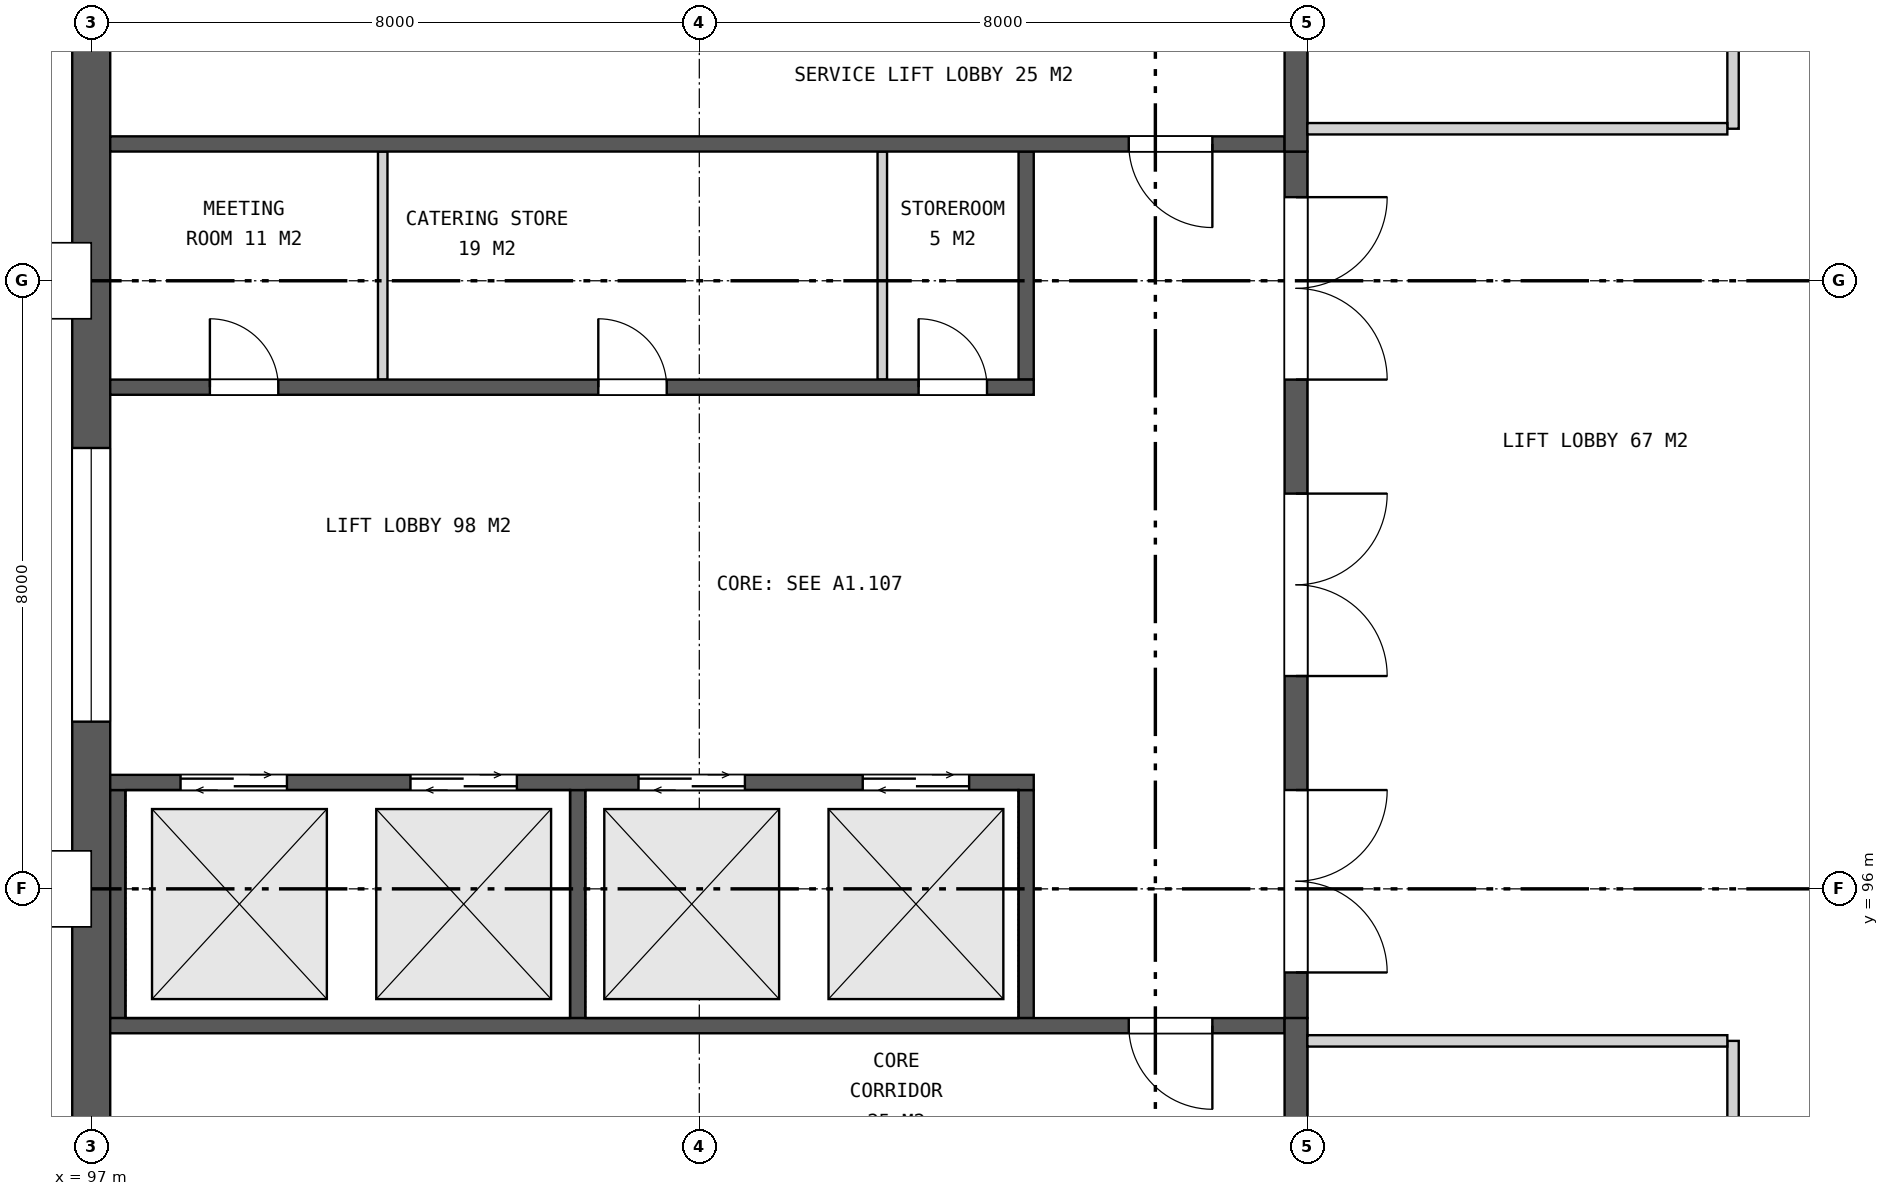
"""IFC4 building model, lengths in metres.
Left out: names, types, materials, properties, quantities, classifications, styles, units other than length and angle.
Written with IfcOpenShell. Run it as: python <this file> out.ifc"""

import sys

from ifc_helpers import new_model, si_unit, direction, frame, frame_2d, origin, place, context, subcontext, project, spatial, rectangle, extrude, element, fill, save


model = new_model("IFC4")
c1 = context("Model", 3, precision=1e-05, world=origin(), true_north=direction((0.0, 1.0)))
c2 = subcontext(c1, "Body", "Model", "MODEL_VIEW")
j1 = project(units=[si_unit("LENGTHUNIT", "METRE"), si_unit("PLANEANGLEUNIT", "RADIAN")], contexts=[c1])
p1 = place(None, origin())
s1 = spatial("IfcSite", under=j1, at=p1, CompositionType="ELEMENT")
p2 = place(p1, origin())
s2 = spatial("IfcBuilding", under=s1, at=p2, CompositionType="ELEMENT")
p3 = place(p2, frame((0.0, 0.0, 344.9)))
s3 = spatial("IfcBuildingStorey", under=s2, at=p3, CompositionType="ELEMENT", Elevation=344.9)
p4 = place(p3, frame((97.0, 111.75, 0.0), z_axis=(0.0, 0.0, 1.0), x_axis=(0.0, -1.0, 0.0)))
e1 = element("IfcWall", 1, at=p4, inside=s3, PredefinedType="SHEAR", context=c2, shape_type="SweptSolid", body=[
    extrude(rectangle(XDim=23.5, YDim=0.5, at=frame_2d((11.75, 0.0))), origin(), (0.0, 0.0, 1.0), 4.2),
])
p5 = place(p4, frame((9.95, 0.0, 0.15)))
e2 = element("IfcOpeningElement", 2, at=p5, cuts=e1, PredefinedType="OPENING", context=c2, shape_type="SweptSolid", body=[
    extrude(rectangle(XDim=3.6, YDim=3.0, at=frame_2d((1.8, 1.5))), frame((0.0, 0.26, 0.0), z_axis=(0.0, -1.0, 0.0), x_axis=(1.0, 0.0, 0.0)), (0.0, 0.0, 1.0), 0.52),
])
p6 = place(p3, frame((112.85, 105.7, 0.0), z_axis=(0.0, 0.0, 1.0), x_axis=(0.0, -1.0, 0.0)))
e3 = element("IfcWall", 3, at=p6, inside=s3, PredefinedType="SHEAR", context=c2, shape_type="SweptSolid", body=[
    extrude(rectangle(XDim=11.4, YDim=0.3, at=frame_2d((5.7, 0.0))), origin(), (0.0, 0.0, 1.0), 4.2),
])
p7 = place(p6, frame((0.6, 0.0, 0.0)))
e4 = element("IfcOpeningElement", 4, at=p7, cuts=e3, PredefinedType="OPENING", context=c2, shape_type="SweptSolid", body=[
    extrude(rectangle(XDim=2.4, YDim=2.4, at=frame_2d((1.2, 1.2))), frame((0.0, 0.16, 0.0), z_axis=(0.0, -1.0, 0.0), x_axis=(1.0, 0.0, 0.0)), (0.0, 0.0, 1.0), 0.32),
])
p8 = place(p6, frame((4.5, 0.0, 0.0)))
e5 = element("IfcOpeningElement", 5, at=p8, cuts=e3, PredefinedType="OPENING", context=c2, shape_type="SweptSolid", body=[
    extrude(rectangle(XDim=2.4, YDim=2.4, at=frame_2d((1.2, 1.2))), frame((0.0, 0.16, 0.0), z_axis=(0.0, -1.0, 0.0), x_axis=(1.0, 0.0, 0.0)), (0.0, 0.0, 1.0), 0.32),
])
p9 = place(p6, frame((8.4, 0.0, 0.0)))
e6 = element("IfcOpeningElement", 6, at=p9, cuts=e3, PredefinedType="OPENING", context=c2, shape_type="SweptSolid", body=[
    extrude(rectangle(XDim=2.4, YDim=2.4, at=frame_2d((1.2, 1.2))), frame((0.0, 0.16, 0.0), z_axis=(0.0, -1.0, 0.0), x_axis=(1.0, 0.0, 0.0)), (0.0, 0.0, 1.0), 0.32),
])
for number, where, z_axis, x_axis in (
    (7, (109.3, 97.3, 0.0), (0.0, 0.0, 1.0), (0.0, -1.0, 0.0)),
    (8, (103.4, 97.3, 0.0), (0.0, 0.0, 1.0), (0.0, -1.0, 0.0)),
    (9, (97.35, 97.3, 0.0), (0.0, 0.0, 1.0), (0.0, -1.0, 0.0)),
):
    element("IfcWall", number, at=place(p3, frame(where, z_axis=z_axis, x_axis=x_axis)), inside=s3, PredefinedType="SHEAR", context=c2, shape_type="SweptSolid", body=[
        extrude(rectangle(XDim=3.0, YDim=0.2, at=frame_2d((1.5, 0.0))), origin(), (0.0, 0.0, 1.0), 4.2),
    ])
p10 = place(p3, frame((109.4, 97.4, 0.0), z_axis=(0.0, 0.0, 1.0), x_axis=(-1.0, 0.0, 0.0)))
e10 = element("IfcWall", 10, at=p10, inside=s3, PredefinedType="SHEAR", context=c2, shape_type="SweptSolid", body=[
    extrude(rectangle(XDim=12.15, YDim=0.2, at=frame_2d((6.075, 0.0))), origin(), (0.0, 0.0, 1.0), 4.2),
])
p11 = place(p10, frame((0.85, 0.0, 0.0)))
e11 = element("IfcOpeningElement", 11, at=p11, cuts=e10, PredefinedType="OPENING", context=c2, shape_type="SweptSolid", body=[
    extrude(rectangle(XDim=1.4, YDim=2.1, at=frame_2d((0.7, 1.05))), frame((0.0, 0.11, 0.0), z_axis=(0.0, -1.0, 0.0), x_axis=(1.0, 0.0, 0.0)), (0.0, 0.0, 1.0), 0.22),
])
p12 = place(p10, frame((3.8, 0.0, 0.0)))
e12 = element("IfcOpeningElement", 12, at=p12, cuts=e10, PredefinedType="OPENING", context=c2, shape_type="SweptSolid", body=[
    extrude(rectangle(XDim=1.4, YDim=2.1, at=frame_2d((0.7, 1.05))), frame((0.0, 0.11, 0.0), z_axis=(0.0, -1.0, 0.0), x_axis=(1.0, 0.0, 0.0)), (0.0, 0.0, 1.0), 0.22),
])
p13 = place(p10, frame((6.8, 0.0, 0.0)))
e13 = element("IfcOpeningElement", 13, at=p13, cuts=e10, PredefinedType="OPENING", context=c2, shape_type="SweptSolid", body=[
    extrude(rectangle(XDim=1.4, YDim=2.1, at=frame_2d((0.7, 1.05))), frame((0.0, 0.11, 0.0), z_axis=(0.0, -1.0, 0.0), x_axis=(1.0, 0.0, 0.0)), (0.0, 0.0, 1.0), 0.22),
])
p14 = place(p10, frame((9.825, 0.0, 0.0)))
e14 = element("IfcOpeningElement", 14, at=p14, cuts=e10, PredefinedType="OPENING", context=c2, shape_type="SweptSolid", body=[
    extrude(rectangle(XDim=1.4, YDim=2.1, at=frame_2d((0.7, 1.05))), frame((0.0, 0.11, 0.0), z_axis=(0.0, -1.0, 0.0), x_axis=(1.0, 0.0, 0.0)), (0.0, 0.0, 1.0), 0.22),
])
p15 = place(p3, frame((109.3, 105.7, 0.0), z_axis=(0.0, 0.0, 1.0), x_axis=(0.0, -1.0, 0.0)))
e15 = element("IfcWall", 15, at=p15, inside=s3, PredefinedType="SHEAR", context=c2, shape_type="SweptSolid", body=[
    extrude(rectangle(XDim=3.0, YDim=0.2, at=frame_2d((1.5, 0.0))), origin(), (0.0, 0.0, 1.0), 4.2),
])
for number, where, z_axis, x_axis in (
    (16, (107.407, 105.7, 0.0), (0.0, 0.0, 1.0), (0.0, -1.0, 0.0)),
    (17, (100.835, 105.7, 0.0), (0.0, 0.0, 1.0), (0.0, -1.0, 0.0)),
):
    element("IfcWall", number, at=place(p3, frame(where, z_axis=z_axis, x_axis=x_axis)), inside=s3, PredefinedType="PARTITIONING", context=c2, shape_type="SweptSolid", body=[
        extrude(rectangle(XDim=3.0, YDim=0.125, at=frame_2d((1.5, 0.0))), origin(), (0.0, 0.0, 1.0), 4.2),
    ])
p16 = place(p3, frame((109.4, 102.6, 0.0), z_axis=(0.0, 0.0, 1.0), x_axis=(-1.0, 0.0, 0.0)))
e18 = element("IfcWall", 18, at=p16, inside=s3, PredefinedType="SHEAR", context=c2, shape_type="SweptSolid", body=[
    extrude(rectangle(XDim=12.15, YDim=0.2, at=frame_2d((6.075, 0.0))), origin(), (0.0, 0.0, 1.0), 4.2),
])
p17 = place(p16, frame((0.615, 0.0, 0.0)))
e19 = element("IfcOpeningElement", 19, at=p17, cuts=e18, PredefinedType="OPENING", context=c2, shape_type="SweptSolid", body=[
    extrude(rectangle(XDim=0.9, YDim=2.1, at=frame_2d((0.45, 1.05))), frame((0.0, 0.11, 0.0), z_axis=(0.0, -1.0, 0.0), x_axis=(1.0, 0.0, 0.0)), (0.0, 0.0, 1.0), 0.22),
])
p18 = place(p16, frame((4.829, 0.0, 0.0)))
e20 = element("IfcOpeningElement", 20, at=p18, cuts=e18, PredefinedType="OPENING", context=c2, shape_type="SweptSolid", body=[
    extrude(rectangle(XDim=0.9, YDim=2.1, at=frame_2d((0.45, 1.05))), frame((0.0, 0.11, 0.0), z_axis=(0.0, -1.0, 0.0), x_axis=(1.0, 0.0, 0.0)), (0.0, 0.0, 1.0), 0.22),
])
p19 = place(p16, frame((9.939, 0.0, 0.0)))
e21 = element("IfcOpeningElement", 21, at=p19, cuts=e18, PredefinedType="OPENING", context=c2, shape_type="SweptSolid", body=[
    extrude(rectangle(XDim=0.9, YDim=2.1, at=frame_2d((0.45, 1.05))), frame((0.0, 0.11, 0.0), z_axis=(0.0, -1.0, 0.0), x_axis=(1.0, 0.0, 0.0)), (0.0, 0.0, 1.0), 0.22),
])
p20 = place(p3, frame((112.7, 94.2, 0.0), z_axis=(0.0, 0.0, 1.0), x_axis=(-1.0, 0.0, 0.0)))
e22 = element("IfcWall", 22, at=p20, inside=s3, PredefinedType="SHEAR", context=c2, shape_type="SweptSolid", body=[
    extrude(rectangle(XDim=15.45, YDim=0.2, at=frame_2d((7.725, 0.0))), origin(), (0.0, 0.0, 1.0), 4.2),
])
p21 = place(p20, frame((0.95, 0.0, 0.0)))
e23 = element("IfcOpeningElement", 23, at=p21, cuts=e22, PredefinedType="OPENING", context=c2, shape_type="SweptSolid", body=[
    extrude(rectangle(XDim=1.1, YDim=2.1, at=frame_2d((0.55, 1.05))), frame((0.0, 0.11, 0.0), z_axis=(0.0, -1.0, 0.0), x_axis=(1.0, 0.0, 0.0)), (0.0, 0.0, 1.0), 0.22),
])
p22 = place(p3, frame((112.85, 94.3, 0.0), z_axis=(0.0, 0.0, 1.0), x_axis=(0.0, -1.0, 0.0)))
e24 = element("IfcWall", 24, at=p22, inside=s3, PredefinedType="SHEAR", context=c2, shape_type="SweptSolid", body=[
    extrude(rectangle(XDim=6.05, YDim=0.3, at=frame_2d((3.025, 0.0))), origin(), (0.0, 0.0, 1.0), 4.2),
])
p23 = place(p3, frame((112.7, 105.8, 0.0), z_axis=(0.0, 0.0, 1.0), x_axis=(-1.0, 0.0, 0.0)))
e25 = element("IfcWall", 25, at=p23, inside=s3, PredefinedType="SHEAR", context=c2, shape_type="SweptSolid", body=[
    extrude(rectangle(XDim=15.45, YDim=0.2, at=frame_2d((7.725, 0.0))), origin(), (0.0, 0.0, 1.0), 4.2),
])
p24 = place(p23, frame((0.95, 0.0, 0.0)))
e26 = element("IfcOpeningElement", 26, at=p24, cuts=e25, PredefinedType="OPENING", context=c2, shape_type="SweptSolid", body=[
    extrude(rectangle(XDim=1.1, YDim=2.1, at=frame_2d((0.55, 1.05))), frame((0.0, 0.11, 0.0), z_axis=(0.0, -1.0, 0.0), x_axis=(1.0, 0.0, 0.0)), (0.0, 0.0, 1.0), 0.22),
])
p25 = place(p3, frame((112.85, 111.75, 0.0), z_axis=(0.0, 0.0, 1.0), x_axis=(0.0, -1.0, 0.0)))
e27 = element("IfcWall", 27, at=p25, inside=s3, PredefinedType="SHEAR", context=c2, shape_type="SweptSolid", body=[
    extrude(rectangle(XDim=6.05, YDim=0.3, at=frame_2d((3.025, 0.0))), origin(), (0.0, 0.0, 1.0), 4.2),
])
p26 = place(p3, frame((118.6, 88.075, 0.0), z_axis=(0.0, 0.0, 1.0), x_axis=(0.0, 1.0, 0.0)))
e28 = element("IfcWall", 28, at=p26, inside=s3, PredefinedType="PARTITIONING", context=c2, shape_type="SweptSolid", body=[
    extrude(rectangle(XDim=5.925, YDim=0.15, at=frame_2d((2.962, 0.0))), origin(), (0.0, 0.0, 1.0), 3.396),
])
p27 = place(p26, frame((2.45, 0.0, 0.0)))
e29 = element("IfcOpeningElement", 29, at=p27, cuts=e28, PredefinedType="OPENING", context=c2, shape_type="SweptSolid", body=[
    extrude(rectangle(XDim=1.0, YDim=2.1, at=frame_2d((0.5, 1.05))), frame((0.0, 0.085, 0.0), z_axis=(0.0, -1.0, 0.0), x_axis=(1.0, 0.0, 0.0)), (0.0, 0.0, 1.0), 0.17),
])
p28 = place(p3, frame((118.6, 106.0, 0.0), z_axis=(0.0, 0.0, 1.0), x_axis=(0.0, 1.0, 0.0)))
e30 = element("IfcWall", 30, at=p28, inside=s3, PredefinedType="PARTITIONING", context=c2, shape_type="SweptSolid", body=[
    extrude(rectangle(XDim=5.925, YDim=0.15, at=frame_2d((2.962, 0.0))), origin(), (0.0, 0.0, 1.0), 3.396),
])
p29 = place(p28, frame((2.45, 0.0, 0.0)))
e31 = element("IfcOpeningElement", 31, at=p29, cuts=e30, PredefinedType="OPENING", context=c2, shape_type="SweptSolid", body=[
    extrude(rectangle(XDim=1.0, YDim=2.1, at=frame_2d((0.5, 1.05))), frame((0.0, 0.085, 0.0), z_axis=(0.0, -1.0, 0.0), x_axis=(1.0, 0.0, 0.0)), (0.0, 0.0, 1.0), 0.17),
])
for number, where, z_axis, x_axis in (
    (32, (113.0, 94.0, 0.0), (0.0, 0.0, 1.0), (1.0, 0.0, 0.0)),
    (33, (113.0, 106.0, 0.0), (0.0, 0.0, 1.0), (1.0, 0.0, 0.0)),
):
    element("IfcWall", number, at=place(p3, frame(where, z_axis=z_axis, x_axis=x_axis)), inside=s3, PredefinedType="PARTITIONING", context=c2, shape_type="SweptSolid", body=[
        extrude(rectangle(XDim=5.525, YDim=0.15, at=frame_2d((2.762, 0.0))), origin(), (0.0, 0.0, 1.0), 3.396),
    ])
p30 = place(p5, origin())
e34 = element("IfcWindow", 34, at=p30, inside=s3, PartitioningType="SINGLE_PANEL", PredefinedType="WINDOW", context=c2, shape_type="SweptSolid", body=[
    extrude(rectangle(XDim=3.6, YDim=3.0, at=frame_2d((1.8, 1.5))), frame((0.0, 0.03, 0.0), z_axis=(0.0, -1.0, 0.0), x_axis=(1.0, 0.0, 0.0)), (0.0, 0.0, 1.0), 0.06),
])
fill(e2, e34)
p31 = place(p7, origin())
e35 = element("IfcDoor", 35, at=p31, inside=s3, OperationType="DOUBLE_DOOR_SINGLE_SWING", PredefinedType="DOOR", context=c2, shape_type="SweptSolid", body=[
    extrude(rectangle(XDim=2.4, YDim=2.4, at=frame_2d((1.2, 1.2))), frame((0.0, 0.025, 0.0), z_axis=(0.0, -1.0, 0.0), x_axis=(1.0, 0.0, 0.0)), (0.0, 0.0, 1.0), 0.05),
])
fill(e4, e35)
p32 = place(p8, origin())
e36 = element("IfcDoor", 36, at=p32, inside=s3, OperationType="DOUBLE_DOOR_SINGLE_SWING", PredefinedType="DOOR", context=c2, shape_type="SweptSolid", body=[
    extrude(rectangle(XDim=2.4, YDim=2.4, at=frame_2d((1.2, 1.2))), frame((0.0, 0.025, 0.0), z_axis=(0.0, -1.0, 0.0), x_axis=(1.0, 0.0, 0.0)), (0.0, 0.0, 1.0), 0.05),
])
fill(e5, e36)
p33 = place(p9, origin())
e37 = element("IfcDoor", 37, at=p33, inside=s3, OperationType="DOUBLE_DOOR_SINGLE_SWING", PredefinedType="DOOR", context=c2, shape_type="SweptSolid", body=[
    extrude(rectangle(XDim=2.4, YDim=2.4, at=frame_2d((1.2, 1.2))), frame((0.0, 0.025, 0.0), z_axis=(0.0, -1.0, 0.0), x_axis=(1.0, 0.0, 0.0)), (0.0, 0.0, 1.0), 0.05),
])
fill(e6, e37)
p34 = place(p11, origin())
e38 = element("IfcDoor", 38, at=p34, inside=s3, OperationType="DOUBLE_DOOR_SLIDING", PredefinedType="DOOR", context=c2, shape_type="SweptSolid", body=[
    extrude(rectangle(XDim=1.4, YDim=2.1, at=frame_2d((0.7, 1.05))), frame((0.0, 0.025, 0.0), z_axis=(0.0, -1.0, 0.0), x_axis=(1.0, 0.0, 0.0)), (0.0, 0.0, 1.0), 0.05),
])
fill(e11, e38)
p35 = place(p12, origin())
e39 = element("IfcDoor", 39, at=p35, inside=s3, OperationType="DOUBLE_DOOR_SLIDING", PredefinedType="DOOR", context=c2, shape_type="SweptSolid", body=[
    extrude(rectangle(XDim=1.4, YDim=2.1, at=frame_2d((0.7, 1.05))), frame((0.0, 0.025, 0.0), z_axis=(0.0, -1.0, 0.0), x_axis=(1.0, 0.0, 0.0)), (0.0, 0.0, 1.0), 0.05),
])
fill(e12, e39)
p36 = place(p13, origin())
e40 = element("IfcDoor", 40, at=p36, inside=s3, OperationType="DOUBLE_DOOR_SLIDING", PredefinedType="DOOR", context=c2, shape_type="SweptSolid", body=[
    extrude(rectangle(XDim=1.4, YDim=2.1, at=frame_2d((0.7, 1.05))), frame((0.0, 0.025, 0.0), z_axis=(0.0, -1.0, 0.0), x_axis=(1.0, 0.0, 0.0)), (0.0, 0.0, 1.0), 0.05),
])
fill(e13, e40)
p37 = place(p14, origin())
e41 = element("IfcDoor", 41, at=p37, inside=s3, OperationType="DOUBLE_DOOR_SLIDING", PredefinedType="DOOR", context=c2, shape_type="SweptSolid", body=[
    extrude(rectangle(XDim=1.4, YDim=2.1, at=frame_2d((0.7, 1.05))), frame((0.0, 0.025, 0.0), z_axis=(0.0, -1.0, 0.0), x_axis=(1.0, 0.0, 0.0)), (0.0, 0.0, 1.0), 0.05),
])
fill(e14, e41)
p38 = place(p17, frame((0.9, 0.0, 0.0), z_axis=(0.0, 0.0, 1.0), x_axis=(-1.0, 0.0, 0.0)))
e42 = element("IfcDoor", 42, at=p38, inside=s3, OperationType="SINGLE_SWING_LEFT", PredefinedType="DOOR", context=c2, shape_type="SweptSolid", body=[
    extrude(rectangle(XDim=0.9, YDim=2.1, at=frame_2d((0.45, 1.05))), frame((0.0, 0.025, 0.0), z_axis=(0.0, -1.0, 0.0), x_axis=(1.0, 0.0, 0.0)), (0.0, 0.0, 1.0), 0.05),
])
fill(e19, e42)
p39 = place(p18, frame((0.9, 0.0, 0.0), z_axis=(0.0, 0.0, 1.0), x_axis=(-1.0, 0.0, 0.0)))
e43 = element("IfcDoor", 43, at=p39, inside=s3, OperationType="SINGLE_SWING_LEFT", PredefinedType="DOOR", context=c2, shape_type="SweptSolid", body=[
    extrude(rectangle(XDim=0.9, YDim=2.1, at=frame_2d((0.45, 1.05))), frame((0.0, 0.025, 0.0), z_axis=(0.0, -1.0, 0.0), x_axis=(1.0, 0.0, 0.0)), (0.0, 0.0, 1.0), 0.05),
])
fill(e20, e43)
p40 = place(p19, frame((0.9, 0.0, 0.0), z_axis=(0.0, 0.0, 1.0), x_axis=(-1.0, 0.0, 0.0)))
e44 = element("IfcDoor", 44, at=p40, inside=s3, OperationType="SINGLE_SWING_LEFT", PredefinedType="DOOR", context=c2, shape_type="SweptSolid", body=[
    extrude(rectangle(XDim=0.9, YDim=2.1, at=frame_2d((0.45, 1.05))), frame((0.0, 0.025, 0.0), z_axis=(0.0, -1.0, 0.0), x_axis=(1.0, 0.0, 0.0)), (0.0, 0.0, 1.0), 0.05),
])
fill(e21, e44)
p41 = place(p21, origin())
e45 = element("IfcDoor", 45, at=p41, inside=s3, OperationType="SINGLE_SWING_LEFT", PredefinedType="DOOR", context=c2, shape_type="SweptSolid", body=[
    extrude(rectangle(XDim=1.1, YDim=2.1, at=frame_2d((0.55, 1.05))), frame((0.0, 0.025, 0.0), z_axis=(0.0, -1.0, 0.0), x_axis=(1.0, 0.0, 0.0)), (0.0, 0.0, 1.0), 0.05),
])
fill(e23, e45)
p42 = place(p24, origin())
e46 = element("IfcDoor", 46, at=p42, inside=s3, OperationType="SINGLE_SWING_LEFT", PredefinedType="DOOR", context=c2, shape_type="SweptSolid", body=[
    extrude(rectangle(XDim=1.1, YDim=2.1, at=frame_2d((0.55, 1.05))), frame((0.0, 0.025, 0.0), z_axis=(0.0, -1.0, 0.0), x_axis=(1.0, 0.0, 0.0)), (0.0, 0.0, 1.0), 0.05),
])
fill(e26, e46)
save(model, sys.argv[1])
